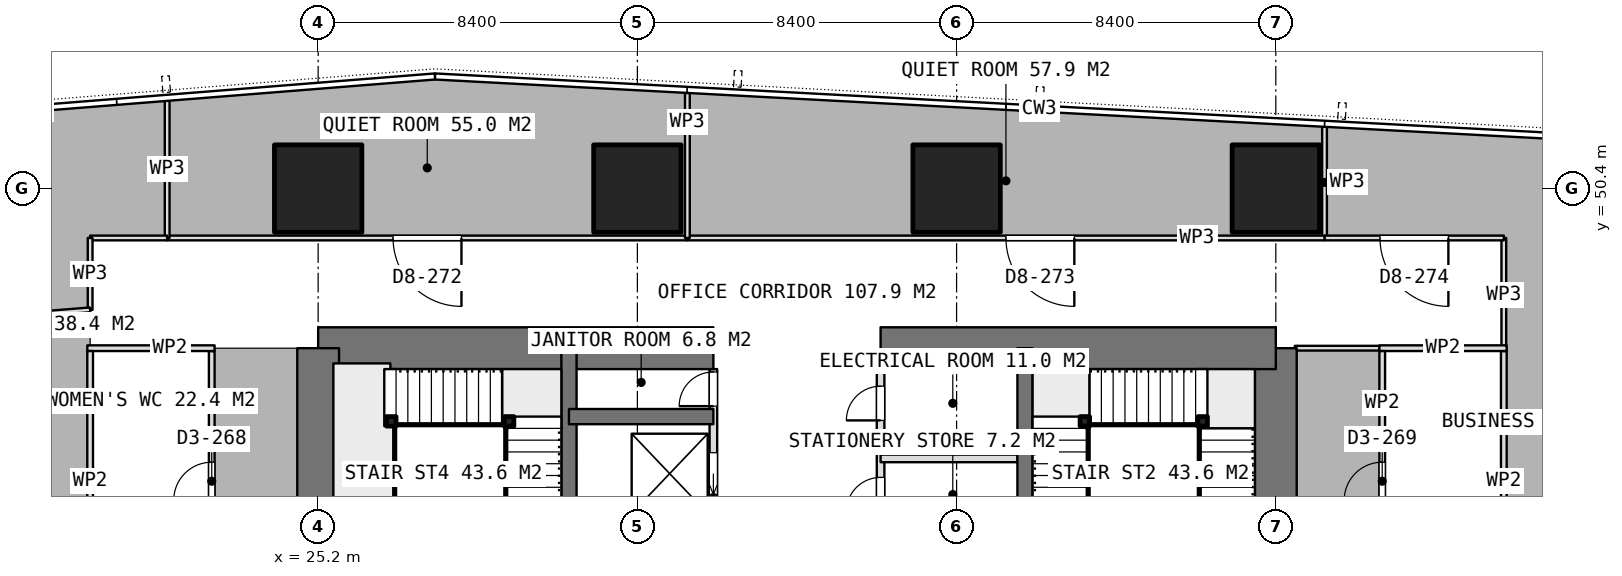
"""IFC4 building model, lengths in metres.
Left out: names, types, materials, properties, quantities, classifications, styles, units other than length and angle.
Written with IfcOpenShell. Run it as: python <this file> out.ifc"""

import sys

from ifc_helpers import new_model, si_unit, direction, frame, frame_2d, origin, origin_2d, place, context, subcontext, project, spatial, rectangle, extrude, element, fill, save


model = new_model("IFC4")
c1 = context("Model", 3, precision=1e-05, world=origin(), true_north=direction((0.0, 1.0)))
c2 = subcontext(c1, "Body", "Model", "MODEL_VIEW")
j1 = project(units=[si_unit("LENGTHUNIT", "METRE"), si_unit("PLANEANGLEUNIT", "RADIAN")], contexts=[c1])
p1 = place(None, origin())
s1 = spatial("IfcSite", under=j1, at=p1, CompositionType="ELEMENT")
p2 = place(p1, origin())
s2 = spatial("IfcBuilding", under=s1, at=p2, CompositionType="ELEMENT")
p3 = place(p2, frame((0.0, 0.0, 250.1)))
s3 = spatial("IfcBuildingStorey", under=s2, at=p3, CompositionType="ELEMENT", Elevation=250.1)
p4 = place(p3, frame((25.2, 46.2, 0.0), z_axis=(0.0, 0.0, 1.0), x_axis=(1.0, 0.0, 0.0)))
e1 = element("IfcWall", 1, at=p4, inside=s3, PredefinedType="SHEAR", context=c2, shape_type="SweptSolid", body=[
    extrude(rectangle(XDim=10.4, YDim=1.1, at=frame_2d((5.2, 0.0))), origin(), (0.0, 0.0, 1.0), 3.75),
])
p5 = place(p3, frame((40.0, 46.2, 0.0), z_axis=(0.0, 0.0, 1.0), x_axis=(1.0, 0.0, 0.0)))
e2 = element("IfcWall", 2, at=p5, inside=s3, PredefinedType="SHEAR", context=c2, shape_type="SweptSolid", body=[
    extrude(rectangle(XDim=10.4, YDim=1.1, at=frame_2d((5.2, 0.0))), origin(), (0.0, 0.0, 1.0), 3.75),
])
p6 = place(p3, frame((25.2, 21.0, 0.0), z_axis=(0.0, 0.0, 1.0), x_axis=(0.0, 1.0, 0.0)))
e3 = element("IfcWall", 3, at=p6, inside=s3, PredefinedType="SHEAR", context=c2, shape_type="SweptSolid", body=[
    extrude(rectangle(XDim=25.2, YDim=1.1, at=frame_2d((12.6, 0.0))), origin(), (0.0, 0.0, 1.0), 3.75),
])
p7 = place(p6, frame((7.8, 0.0, 0.0)))
e4 = element("IfcOpeningElement", 4, at=p7, cuts=e3, PredefinedType="OPENING", context=c2, shape_type="SweptSolid", body=[
    extrude(rectangle(XDim=1.2, YDim=2.1, at=frame_2d((0.6, 1.05))), frame((0.0, 0.56, 0.0), z_axis=(0.0, -1.0, 0.0), x_axis=(1.0, 0.0, 0.0)), (0.0, 0.0, 1.0), 1.12),
])
p8 = place(p6, frame((14.25, 0.0, 0.0)))
e5 = element("IfcOpeningElement", 5, at=p8, cuts=e3, PredefinedType="OPENING", context=c2, shape_type="SweptSolid", body=[
    extrude(rectangle(XDim=0.9, YDim=2.1, at=frame_2d((0.45, 1.05))), frame((0.0, 0.56, 0.0), z_axis=(0.0, -1.0, 0.0), x_axis=(1.0, 0.0, 0.0)), (0.0, 0.0, 1.0), 1.12),
])
p9 = place(p6, frame((16.85, 0.0, 0.0)))
e6 = element("IfcOpeningElement", 6, at=p9, cuts=e3, PredefinedType="OPENING", context=c2, shape_type="SweptSolid", body=[
    extrude(rectangle(XDim=0.9, YDim=2.1, at=frame_2d((0.45, 1.05))), frame((0.0, 0.56, 0.0), z_axis=(0.0, -1.0, 0.0), x_axis=(1.0, 0.0, 0.0)), (0.0, 0.0, 1.0), 1.12),
])
p10 = place(p6, frame((19.0, 0.0, 0.0)))
e7 = element("IfcOpeningElement", 7, at=p10, cuts=e3, PredefinedType="OPENING", context=c2, shape_type="SweptSolid", body=[
    extrude(rectangle(XDim=1.2, YDim=2.1, at=frame_2d((0.6, 1.05))), frame((0.0, 0.56, 0.0), z_axis=(0.0, -1.0, 0.0), x_axis=(1.0, 0.0, 0.0)), (0.0, 0.0, 1.0), 1.12),
])
p11 = place(p3, frame((50.4, 21.0, 0.0), z_axis=(0.0, 0.0, 1.0), x_axis=(0.0, 1.0, 0.0)))
e8 = element("IfcWall", 8, at=p11, inside=s3, PredefinedType="SHEAR", context=c2, shape_type="SweptSolid", body=[
    extrude(rectangle(XDim=25.2, YDim=1.1, at=frame_2d((12.6, 0.0))), origin(), (0.0, 0.0, 1.0), 3.75),
])
p12 = place(p11, frame((16.2, 0.0, 0.0)))
e9 = element("IfcOpeningElement", 9, at=p12, cuts=e8, PredefinedType="OPENING", context=c2, shape_type="SweptSolid", body=[
    extrude(rectangle(XDim=1.2, YDim=2.1, at=frame_2d((0.6, 1.05))), frame((0.0, 0.56, 0.0), z_axis=(0.0, -1.0, 0.0), x_axis=(1.0, 0.0, 0.0)), (0.0, 0.0, 1.0), 1.12),
])
p13 = place(p11, frame((10.05, 0.0, 0.0)))
e10 = element("IfcOpeningElement", 10, at=p13, cuts=e8, PredefinedType="OPENING", context=c2, shape_type="SweptSolid", body=[
    extrude(rectangle(XDim=0.9, YDim=2.1, at=frame_2d((0.45, 1.05))), frame((0.0, 0.56, 0.0), z_axis=(0.0, -1.0, 0.0), x_axis=(1.0, 0.0, 0.0)), (0.0, 0.0, 1.0), 1.12),
])
p14 = place(p11, frame((7.45, 0.0, 0.0)))
e11 = element("IfcOpeningElement", 11, at=p14, cuts=e8, PredefinedType="OPENING", context=c2, shape_type="SweptSolid", body=[
    extrude(rectangle(XDim=0.9, YDim=2.1, at=frame_2d((0.45, 1.05))), frame((0.0, 0.56, 0.0), z_axis=(0.0, -1.0, 0.0), x_axis=(1.0, 0.0, 0.0)), (0.0, 0.0, 1.0), 1.12),
])
p15 = place(p11, frame((0.75, 0.0, 0.0)))
e12 = element("IfcOpeningElement", 12, at=p15, cuts=e8, PredefinedType="OPENING", context=c2, shape_type="SweptSolid", body=[
    extrude(rectangle(XDim=1.2, YDim=2.1, at=frame_2d((0.6, 1.05))), frame((0.0, 0.56, 0.0), z_axis=(0.0, -1.0, 0.0), x_axis=(1.0, 0.0, 0.0)), (0.0, 0.0, 1.0), 1.12),
])
for number, where, z_axis, x_axis in (
    (13, (31.8, 21.0, 0.0), (0.0, 0.0, 1.0), (0.0, 1.0, 0.0)),
    (14, (43.8, 21.0, 0.0), (0.0, 0.0, 1.0), (0.0, 1.0, 0.0)),
):
    element("IfcWall", number, at=place(p3, frame(where, z_axis=z_axis, x_axis=x_axis)), inside=s3, PredefinedType="SHEAR", context=c2, shape_type="SweptSolid", body=[
        extrude(rectangle(XDim=25.2, YDim=0.4, at=frame_2d((12.6, 0.0))), origin(), (0.0, 0.0, 1.0), 3.75),
    ])
p16 = place(p3, frame((31.8, 44.4, 0.0), z_axis=(0.0, 0.0, 1.0), x_axis=(1.0, 0.0, 0.0)))
e15 = element("IfcWall", 15, at=p16, inside=s3, PredefinedType="SHEAR", context=c2, shape_type="SweptSolid", body=[
    extrude(rectangle(XDim=3.8, YDim=0.4, at=frame_2d((1.9, 0.0))), origin(), (0.0, 0.0, 1.0), 3.75),
])
for number, where, z_axis, x_axis in (
    (16, (25.2, 50.4, 0.0), (0.0, 0.0, 1.0), (1.0, 0.0, 0.0)),
    (17, (33.6, 50.4, 0.0), (0.0, 0.0, 1.0), (1.0, 0.0, 0.0)),
    (18, (42.0, 50.4, 0.0), (0.0, 0.0, 1.0), (1.0, 0.0, 0.0)),
    (19, (50.4, 50.4, 0.0), (0.0, 0.0, 1.0), (1.0, 0.0, 0.0)),
):
    element("IfcColumn", number, at=place(p3, frame(where, z_axis=z_axis, x_axis=x_axis)), inside=s3, PredefinedType="COLUMN", context=c2, shape_type="SweptSolid", body=[
        extrude(rectangle(XDim=2.3, YDim=2.3, at=origin_2d()), origin(), (0.0, 0.0, 1.0), 3.75),
    ])
p17 = place(p3, frame((40.0, 41.6, 0.0), z_axis=(0.0, 0.0, 1.0), x_axis=(0.0, 1.0, 0.0)))
e20 = element("IfcWall", 20, at=p17, inside=s3, PredefinedType="PARTITIONING", context=c2, shape_type="SweptSolid", body=[
    extrude(rectangle(XDim=4.05, YDim=0.2, at=frame_2d((2.025, 0.0))), origin(), (0.0, 0.0, 1.0), 3.5),
])
p18 = place(p17, frame((2.7, 0.0, 0.0)))
e21 = element("IfcOpeningElement", 21, at=p18, cuts=e20, PredefinedType="OPENING", context=c2, shape_type="SweptSolid", body=[
    extrude(rectangle(XDim=0.9, YDim=2.1, at=frame_2d((0.45, 1.05))), frame((0.0, 0.11, 0.0), z_axis=(0.0, -1.0, 0.0), x_axis=(1.0, 0.0, 0.0)), (0.0, 0.0, 1.0), 0.22),
])
p19 = place(p17, frame((0.3, 0.0, 0.0)))
e22 = element("IfcOpeningElement", 22, at=p19, cuts=e20, PredefinedType="OPENING", context=c2, shape_type="SweptSolid", body=[
    extrude(rectangle(XDim=0.9, YDim=2.1, at=frame_2d((0.45, 1.05))), frame((0.0, 0.11, 0.0), z_axis=(0.0, -1.0, 0.0), x_axis=(1.0, 0.0, 0.0)), (0.0, 0.0, 1.0), 0.22),
])
p20 = place(p3, frame((35.6, 41.6, 0.0), z_axis=(0.0, 0.0, 1.0), x_axis=(0.0, 1.0, 0.0)))
e23 = element("IfcWall", 23, at=p20, inside=s3, PredefinedType="PARTITIONING", context=c2, shape_type="SweptSolid", body=[
    extrude(rectangle(XDim=4.05, YDim=0.2, at=frame_2d((2.025, 0.0))), origin(), (0.0, 0.0, 1.0), 3.5),
])
p21 = place(p20, frame((3.075, 0.0, 0.0)))
e24 = element("IfcOpeningElement", 24, at=p21, cuts=e23, PredefinedType="OPENING", context=c2, shape_type="SweptSolid", body=[
    extrude(rectangle(XDim=0.9, YDim=2.1, at=frame_2d((0.45, 1.05))), frame((0.0, 0.11, 0.0), z_axis=(0.0, -1.0, 0.0), x_axis=(1.0, 0.0, 0.0)), (0.0, 0.0, 1.0), 0.22),
])
p22 = place(p20, frame((0.75, 0.0, 0.0)))
e25 = element("IfcOpeningElement", 25, at=p22, cuts=e23, PredefinedType="OPENING", context=c2, shape_type="SweptSolid", body=[
    extrude(rectangle(XDim=1.1, YDim=2.1, at=frame_2d((0.55, 1.05))), frame((0.0, 0.11, 0.0), z_axis=(0.0, -1.0, 0.0), x_axis=(1.0, 0.0, 0.0)), (0.0, 0.0, 1.0), 0.22),
])
p23 = place(p3, frame((40.0, 43.3, 0.0), z_axis=(0.0, 0.0, 1.0), x_axis=(1.0, 0.0, 0.0)))
e26 = element("IfcWall", 26, at=p23, inside=s3, PredefinedType="PARTITIONING", context=c2, shape_type="SweptSolid", body=[
    extrude(rectangle(XDim=3.6, YDim=0.2, at=frame_2d((1.8, 0.0))), origin(), (0.0, 0.0, 1.0), 3.5),
])
p24 = place(p3, frame((53.125, 46.2, 0.0), z_axis=(0.0, 0.0, 1.0), x_axis=(1.0, 0.0, 0.0)))
e27 = element("IfcWall", 27, at=p24, inside=s3, PredefinedType="PARTITIONING", context=c2, shape_type="SweptSolid", body=[
    extrude(rectangle(XDim=3.35, YDim=0.15, at=frame_2d((1.675, 0.0))), origin(), (0.0, 0.0, 1.0), 3.5),
])
p25 = place(p3, frame((53.2, 39.275, 0.0), z_axis=(0.0, 0.0, 1.0), x_axis=(0.0, 1.0, 0.0)))
e28 = element("IfcWall", 28, at=p25, inside=s3, PredefinedType="PARTITIONING", context=c2, shape_type="SweptSolid", body=[
    extrude(rectangle(XDim=6.85, YDim=0.15, at=frame_2d((3.425, 0.0))), origin(), (0.0, 0.0, 1.0), 3.5),
])
p26 = place(p25, frame((2.925, 0.0, 0.0)))
e29 = element("IfcOpeningElement", 29, at=p26, cuts=e28, PredefinedType="OPENING", context=c2, shape_type="SweptSolid", body=[
    extrude(rectangle(XDim=1.0, YDim=2.1, at=frame_2d((0.5, 1.05))), frame((0.0, 0.085, 0.0), z_axis=(0.0, -1.0, 0.0), x_axis=(1.0, 0.0, 0.0)), (0.0, 0.0, 1.0), 0.17),
])
p27 = place(p3, frame((56.4, 39.275, 0.0), z_axis=(0.0, 0.0, 1.0), x_axis=(0.0, 1.0, 0.0)))
e30 = element("IfcWall", 30, at=p27, inside=s3, PredefinedType="PARTITIONING", context=c2, shape_type="SweptSolid", body=[
    extrude(rectangle(XDim=6.85, YDim=0.15, at=frame_2d((3.425, 0.0))), origin(), (0.0, 0.0, 1.0), 3.5),
])
p28 = place(p3, frame((19.125, 46.2, 0.0), z_axis=(0.0, 0.0, 1.0), x_axis=(1.0, 0.0, 0.0)))
e31 = element("IfcWall", 31, at=p28, inside=s3, PredefinedType="PARTITIONING", context=c2, shape_type="SweptSolid", body=[
    extrude(rectangle(XDim=3.35, YDim=0.15, at=frame_2d((1.675, 0.0))), origin(), (0.0, 0.0, 1.0), 3.5),
])
p29 = place(p3, frame((19.2, 39.275, 0.0), z_axis=(0.0, 0.0, 1.0), x_axis=(0.0, 1.0, 0.0)))
e32 = element("IfcWall", 32, at=p29, inside=s3, PredefinedType="PARTITIONING", context=c2, shape_type="SweptSolid", body=[
    extrude(rectangle(XDim=6.85, YDim=0.15, at=frame_2d((3.425, 0.0))), origin(), (0.0, 0.0, 1.0), 3.5),
])
p30 = place(p3, frame((22.4, 39.275, 0.0), z_axis=(0.0, 0.0, 1.0), x_axis=(0.0, 1.0, 0.0)))
e33 = element("IfcWall", 33, at=p30, inside=s3, PredefinedType="PARTITIONING", context=c2, shape_type="SweptSolid", body=[
    extrude(rectangle(XDim=6.85, YDim=0.15, at=frame_2d((3.425, 0.0))), origin(), (0.0, 0.0, 1.0), 3.5),
])
p31 = place(p30, frame((2.925, 0.0, 0.0)))
e34 = element("IfcOpeningElement", 34, at=p31, cuts=e33, PredefinedType="OPENING", context=c2, shape_type="SweptSolid", body=[
    extrude(rectangle(XDim=1.0, YDim=2.1, at=frame_2d((0.5, 1.05))), frame((0.0, 0.085, 0.0), z_axis=(0.0, -1.0, 0.0), x_axis=(1.0, 0.0, 0.0)), (0.0, 0.0, 1.0), 0.17),
])
p32 = place(p3, frame((50.9, 46.2, 0.0), z_axis=(0.0, 0.0, 1.0), x_axis=(1.0, 0.0, 0.0)))
e35 = element("IfcWall", 35, at=p32, inside=s3, PredefinedType="PARTITIONING", context=c2, shape_type="SweptSolid", body=[
    extrude(rectangle(XDim=2.224, YDim=0.125, at=frame_2d((1.112, 0.0))), origin(), (0.0, 0.0, 1.0), 3.5),
])
p33 = place(p3, frame((51.682, 49.1, 0.0), z_axis=(0.0, 0.0, 1.0), x_axis=(0.0, 1.0, 0.0)))
e36 = element("IfcWall", 36, at=p33, inside=s3, PredefinedType="PARTITIONING", context=c2, shape_type="SweptSolid", body=[
    extrude(rectangle(XDim=2.926, YDim=0.125, at=frame_2d((1.463, 0.0))), origin(), (0.0, 0.0, 1.0), 3.5),
])
p34 = place(p3, frame((56.4, 46.125, 0.0), z_axis=(0.0, 0.0, 1.0), x_axis=(0.0, 1.0, 0.0)))
e37 = element("IfcWall", 37, at=p34, inside=s3, PredefinedType="PARTITIONING", context=c2, shape_type="SweptSolid", body=[
    extrude(rectangle(XDim=2.975, YDim=0.125, at=frame_2d((1.488, 0.0))), origin(), (0.0, 0.0, 1.0), 3.5),
])
p35 = place(p3, frame((56.4, 49.1, 0.0), z_axis=(0.0, 0.0, 1.0), x_axis=(-1.0, 0.0, 0.0)))
e38 = element("IfcWall", 38, at=p35, inside=s3, PredefinedType="PARTITIONING", context=c2, shape_type="SweptSolid", body=[
    extrude(rectangle(XDim=4.718, YDim=0.125, at=frame_2d((2.359, 0.0))), origin(), (0.0, 0.0, 1.0), 3.5),
])
p36 = place(p35, frame((1.459, 0.0, 0.0)))
e39 = element("IfcOpeningElement", 39, at=p36, cuts=e38, PredefinedType="OPENING", context=c2, shape_type="SweptSolid", body=[
    extrude(rectangle(XDim=1.8, YDim=2.1, at=frame_2d((0.9, 1.05))), frame((0.0, 0.073, 0.0), z_axis=(0.0, -1.0, 0.0), x_axis=(1.0, 0.0, 0.0)), (0.0, 0.0, 1.0), 0.145),
])
p37 = place(p3, frame((51.681, 49.1, 0.0), z_axis=(0.0, 0.0, 1.0), x_axis=(-1.0, 0.0, 0.0)))
e40 = element("IfcWall", 40, at=p37, inside=s3, PredefinedType="PARTITIONING", context=c2, shape_type="SweptSolid", body=[
    extrude(rectangle(XDim=16.765, YDim=0.125, at=frame_2d((8.382, 0.0))), origin(), (0.0, 0.0, 1.0), 3.5),
])
p38 = place(p37, frame((6.583, 0.0, 0.0)))
e41 = element("IfcOpeningElement", 41, at=p38, cuts=e40, PredefinedType="OPENING", context=c2, shape_type="SweptSolid", body=[
    extrude(rectangle(XDim=1.8, YDim=2.1, at=frame_2d((0.9, 1.05))), frame((0.0, 0.073, 0.0), z_axis=(0.0, -1.0, 0.0), x_axis=(1.0, 0.0, 0.0)), (0.0, 0.0, 1.0), 0.145),
])
p39 = place(p3, frame((34.916, 49.1, 0.0), z_axis=(0.0, 0.0, 1.0), x_axis=(0.0, 1.0, 0.0)))
e42 = element("IfcWall", 42, at=p39, inside=s3, PredefinedType="PARTITIONING", context=c2, shape_type="SweptSolid", body=[
    extrude(rectangle(XDim=3.817, YDim=0.125, at=frame_2d((1.908, 0.0))), origin(), (0.0, 0.0, 1.0), 3.5),
])
p40 = place(p3, frame((34.915, 49.1, 0.0), z_axis=(0.0, 0.0, 1.0), x_axis=(-1.0, 0.0, 0.0)))
e43 = element("IfcWall", 43, at=p40, inside=s3, PredefinedType="PARTITIONING", context=c2, shape_type="SweptSolid", body=[
    extrude(rectangle(XDim=13.688, YDim=0.125, at=frame_2d((6.844, 0.0))), origin(), (0.0, 0.0, 1.0), 3.5),
])
p41 = place(p40, frame((5.944, 0.0, 0.0)))
e44 = element("IfcOpeningElement", 44, at=p41, cuts=e43, PredefinedType="OPENING", context=c2, shape_type="SweptSolid", body=[
    extrude(rectangle(XDim=1.8, YDim=2.1, at=frame_2d((0.9, 1.05))), frame((0.0, 0.073, 0.0), z_axis=(0.0, -1.0, 0.0), x_axis=(1.0, 0.0, 0.0)), (0.0, 0.0, 1.0), 0.145),
])
p42 = place(p3, frame((21.227, 49.1, 0.0), z_axis=(0.0, 0.0, 1.0), x_axis=(0.0, 1.0, 0.0)))
e45 = element("IfcWall", 45, at=p42, inside=s3, PredefinedType="PARTITIONING", context=c2, shape_type="SweptSolid", body=[
    extrude(rectangle(XDim=3.608, YDim=0.125, at=frame_2d((1.804, 0.0))), origin(), (0.0, 0.0, 1.0), 3.5),
])
p43 = place(p3, frame((21.226, 49.1, 0.0), z_axis=(0.0, 0.0, 1.0), x_axis=(-1.0, 0.0, 0.0)))
e46 = element("IfcWall", 46, at=p43, inside=s3, PredefinedType="PARTITIONING", context=c2, shape_type="SweptSolid", body=[
    extrude(rectangle(XDim=2.026, YDim=0.125, at=frame_2d((1.013, 0.0))), origin(), (0.0, 0.0, 1.0), 3.5),
])
p44 = place(p3, frame((19.2, 49.1, 0.0), z_axis=(0.0, 0.0, 1.0), x_axis=(0.0, -1.0, 0.0)))
e47 = element("IfcWall", 47, at=p44, inside=s3, PredefinedType="PARTITIONING", context=c2, shape_type="SweptSolid", body=[
    extrude(rectangle(XDim=1.891, YDim=0.125, at=frame_2d((0.946, 0.0))), origin(), (0.0, 0.0, 1.0), 3.5),
])
p45 = place(p3, frame((19.2, 47.209, 0.0), z_axis=(0.0, 0.0, 1.0), x_axis=(-0.996831568036, -0.079541341248, 0.0)))
e48 = element("IfcWall", 48, at=p45, inside=s3, PredefinedType="PARTITIONING", context=c2, shape_type="SweptSolid", body=[
    extrude(rectangle(XDim=3.76, YDim=0.125, at=frame_2d((1.88, 0.0))), origin(), (0.0, 0.0, 1.0), 3.5),
])
for number, where, z_axis, x_axis in (
    (49, (45.375, 44.275, 0.0), (0.0, 0.0, 1.0), (1.0, 0.0, 0.0)),
    (50, (48.475, 44.275, 0.0), (0.0, 0.0, 1.0), (1.0, 0.0, 0.0)),
    (51, (30.225, 44.275, 0.0), (0.0, 0.0, 1.0), (1.0, 0.0, 0.0)),
    (52, (27.125, 44.275, 0.0), (0.0, 0.0, 1.0), (1.0, 0.0, 0.0)),
):
    element("IfcColumn", number, at=place(p3, frame(where, z_axis=z_axis, x_axis=x_axis)), inside=s3, PredefinedType="COLUMN", context=c2, shape_type="SweptSolid", body=[
        extrude(rectangle(XDim=0.25, YDim=0.25, at=origin_2d()), origin(), (0.0, 0.0, 1.0), 3.75),
    ])
p46 = place(p18, origin())
e53 = element("IfcDoor", 53, at=p46, inside=s3, OperationType="SINGLE_SWING_LEFT", PredefinedType="DOOR", context=c2, shape_type="SweptSolid", body=[
    extrude(rectangle(XDim=0.9, YDim=2.1, at=frame_2d((0.45, 1.05))), frame((0.0, 0.025, 0.0), z_axis=(0.0, -1.0, 0.0), x_axis=(1.0, 0.0, 0.0)), (0.0, 0.0, 1.0), 0.05),
])
fill(e21, e53)
p47 = place(p19, origin())
e54 = element("IfcDoor", 54, at=p47, inside=s3, OperationType="SINGLE_SWING_LEFT", PredefinedType="DOOR", context=c2, shape_type="SweptSolid", body=[
    extrude(rectangle(XDim=0.9, YDim=2.1, at=frame_2d((0.45, 1.05))), frame((0.0, 0.025, 0.0), z_axis=(0.0, -1.0, 0.0), x_axis=(1.0, 0.0, 0.0)), (0.0, 0.0, 1.0), 0.05),
])
fill(e22, e54)
p48 = place(p21, origin())
e55 = element("IfcDoor", 55, at=p48, inside=s3, OperationType="SINGLE_SWING_LEFT", PredefinedType="DOOR", context=c2, shape_type="SweptSolid", body=[
    extrude(rectangle(XDim=0.9, YDim=2.1, at=frame_2d((0.45, 1.05))), frame((0.0, 0.025, 0.0), z_axis=(0.0, -1.0, 0.0), x_axis=(1.0, 0.0, 0.0)), (0.0, 0.0, 1.0), 0.05),
])
fill(e24, e55)
p49 = place(p22, origin())
e56 = element("IfcDoor", 56, at=p49, inside=s3, OperationType="SLIDING_TO_LEFT", PredefinedType="USERDEFINED", context=c2, shape_type="SweptSolid", body=[
    extrude(rectangle(XDim=1.1, YDim=2.1, at=frame_2d((0.55, 1.05))), frame((0.0, 0.025, 0.0), z_axis=(0.0, -1.0, 0.0), x_axis=(1.0, 0.0, 0.0)), (0.0, 0.0, 1.0), 0.05),
])
fill(e25, e56)
p50 = place(p26, origin())
e57 = element("IfcDoor", 57, at=p50, inside=s3, OperationType="SINGLE_SWING_LEFT", PredefinedType="DOOR", context=c2, shape_type="SweptSolid", body=[
    extrude(rectangle(XDim=1.0, YDim=2.1, at=frame_2d((0.5, 1.05))), frame((0.0, 0.025, 0.0), z_axis=(0.0, -1.0, 0.0), x_axis=(1.0, 0.0, 0.0)), (0.0, 0.0, 1.0), 0.05),
])
fill(e29, e57)
p51 = place(p31, origin())
e58 = element("IfcDoor", 58, at=p51, inside=s3, OperationType="SINGLE_SWING_LEFT", PredefinedType="DOOR", context=c2, shape_type="SweptSolid", body=[
    extrude(rectangle(XDim=1.0, YDim=2.1, at=frame_2d((0.5, 1.05))), frame((0.0, 0.025, 0.0), z_axis=(0.0, -1.0, 0.0), x_axis=(1.0, 0.0, 0.0)), (0.0, 0.0, 1.0), 0.05),
])
fill(e34, e58)
p52 = place(p36, origin())
e59 = element("IfcDoor", 59, at=p52, inside=s3, OperationType="DOUBLE_DOOR_SINGLE_SWING", PredefinedType="DOOR", context=c2, shape_type="SweptSolid", body=[
    extrude(rectangle(XDim=1.8, YDim=2.1, at=frame_2d((0.9, 1.05))), frame((0.0, 0.025, 0.0), z_axis=(0.0, -1.0, 0.0), x_axis=(1.0, 0.0, 0.0)), (0.0, 0.0, 1.0), 0.05),
])
fill(e39, e59)
p53 = place(p38, origin())
e60 = element("IfcDoor", 60, at=p53, inside=s3, OperationType="DOUBLE_DOOR_SINGLE_SWING", PredefinedType="DOOR", context=c2, shape_type="SweptSolid", body=[
    extrude(rectangle(XDim=1.8, YDim=2.1, at=frame_2d((0.9, 1.05))), frame((0.0, 0.025, 0.0), z_axis=(0.0, -1.0, 0.0), x_axis=(1.0, 0.0, 0.0)), (0.0, 0.0, 1.0), 0.05),
])
fill(e41, e60)
p54 = place(p41, origin())
e61 = element("IfcDoor", 61, at=p54, inside=s3, OperationType="DOUBLE_DOOR_SINGLE_SWING", PredefinedType="DOOR", context=c2, shape_type="SweptSolid", body=[
    extrude(rectangle(XDim=1.8, YDim=2.1, at=frame_2d((0.9, 1.05))), frame((0.0, 0.025, 0.0), z_axis=(0.0, -1.0, 0.0), x_axis=(1.0, 0.0, 0.0)), (0.0, 0.0, 1.0), 0.05),
])
fill(e44, e61)
save(model, sys.argv[1])
